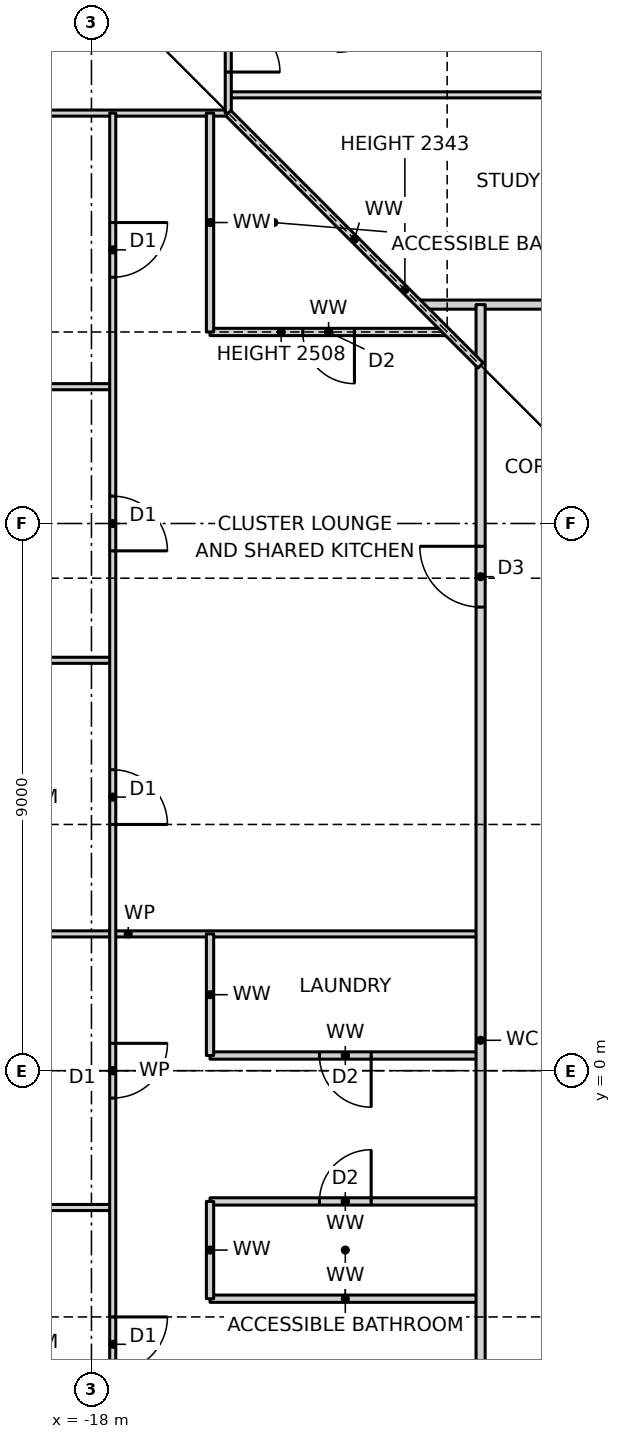
"""IFC4 building model, lengths in metres.
Left out: names, types, materials, properties, quantities, classifications, styles, units other than length and angle.
Written with IfcOpenShell. Run it as: python <this file> out.ifc"""

import sys

from ifc_helpers import new_model, si_unit, direction, frame, frame_2d, origin, place, context, subcontext, project, spatial, rectangle, extrude, element, fill, save


model = new_model("IFC4")
c1 = context("Model", 3, precision=1e-05, world=origin(), true_north=direction((0.0, 1.0)))
c2 = subcontext(c1, "Body", "Model", "MODEL_VIEW")
j1 = project(units=[si_unit("LENGTHUNIT", "METRE"), si_unit("PLANEANGLEUNIT", "RADIAN")], contexts=[c1])
p1 = place(None, origin())
s1 = spatial("IfcSite", under=j1, at=p1, CompositionType="ELEMENT")
p2 = place(p1, origin())
s2 = spatial("IfcBuilding", under=s1, at=p2, CompositionType="ELEMENT")
p3 = place(p2, frame((0.0, 0.0, 60.5)))
s3 = spatial("IfcBuildingStorey", under=s2, at=p3, CompositionType="ELEMENT", Elevation=60.5)
p4 = place(p3, frame((-16.05, -3.75, 0.0), z_axis=(0.0, 0.0, 1.0), x_axis=(1.0, 0.0, 0.0)))
e1 = element("IfcWall", 1, at=p4, inside=s3, PredefinedType="PARTITIONING", context=c2, shape_type="SweptSolid", body=[
    extrude(rectangle(XDim=4.45, YDim=0.12, at=frame_2d((2.225, 0.0))), origin(), (0.0, 0.0, 1.0), 3.27),
])
p5 = place(p3, frame((-23.19, -2.25, 0.0), z_axis=(0.0, 0.0, 1.0), x_axis=(1.0, 0.0, 0.0)))
e2 = element("IfcWall", 2, at=p5, inside=s3, PredefinedType="PARTITIONING", context=c2, shape_type="SweptSolid", body=[
    extrude(rectangle(XDim=5.54, YDim=0.1, at=frame_2d((2.77, 0.0))), origin(), (0.0, 0.0, 1.0), 3.27),
])
p6 = place(p3, frame((-16.05, -2.15, 0.0), z_axis=(0.0, 0.0, 1.0), x_axis=(1.0, 0.0, 0.0)))
e3 = element("IfcWall", 3, at=p6, inside=s3, PredefinedType="PARTITIONING", context=c2, shape_type="SweptSolid", body=[
    extrude(rectangle(XDim=4.45, YDim=0.12, at=frame_2d((2.225, 0.0))), origin(), (0.0, 0.0, 1.0), 3.27),
])
p7 = place(p6, frame((1.8, 0.0, 0.0)))
e4 = element("IfcOpeningElement", 4, at=p7, cuts=e3, PredefinedType="OPENING", context=c2, shape_type="SweptSolid", body=[
    extrude(rectangle(XDim=0.85, YDim=2.1, at=frame_2d((0.425, 1.05))), frame((0.0, 0.07, 0.0), z_axis=(0.0, -1.0, 0.0), x_axis=(1.0, 0.0, 0.0)), (0.0, 0.0, 1.0), 0.14),
])
p8 = place(p3, frame((-16.05, 0.25, 0.0), z_axis=(0.0, 0.0, 1.0), x_axis=(1.0, 0.0, 0.0)))
e5 = element("IfcWall", 5, at=p8, inside=s3, PredefinedType="PARTITIONING", context=c2, shape_type="SweptSolid", body=[
    extrude(rectangle(XDim=4.45, YDim=0.12, at=frame_2d((2.225, 0.0))), origin(), (0.0, 0.0, 1.0), 3.27),
])
p9 = place(p8, frame((1.8, 0.0, 0.0)))
e6 = element("IfcOpeningElement", 6, at=p9, cuts=e5, PredefinedType="OPENING", context=c2, shape_type="SweptSolid", body=[
    extrude(rectangle(XDim=0.85, YDim=2.1, at=frame_2d((0.425, 1.05))), frame((0.0, 0.07, 0.0), z_axis=(0.0, -1.0, 0.0), x_axis=(1.0, 0.0, 0.0)), (0.0, 0.0, 1.0), 0.14),
])
p10 = place(p3, frame((-23.19, 2.25, 0.0), z_axis=(0.0, 0.0, 1.0), x_axis=(1.0, 0.0, 0.0)))
e7 = element("IfcWall", 7, at=p10, inside=s3, PredefinedType="PARTITIONING", context=c2, shape_type="SweptSolid", body=[
    extrude(rectangle(XDim=11.59, YDim=0.1, at=frame_2d((5.795, 0.0))), origin(), (0.0, 0.0, 1.0), 3.27),
])
for number, where, z_axis, x_axis in (
    (8, (-23.19, 6.75, 0.0), (0.0, 0.0, 1.0), (1.0, 0.0, 0.0)),
    (9, (-23.19, 11.25, 0.0), (0.0, 0.0, 1.0), (1.0, 0.0, 0.0)),
):
    element("IfcWall", number, at=place(p3, frame(where, z_axis=z_axis, x_axis=x_axis)), inside=s3, PredefinedType="PARTITIONING", context=c2, shape_type="SweptSolid", body=[
        extrude(rectangle(XDim=5.54, YDim=0.1, at=frame_2d((2.77, 0.0))), origin(), (0.0, 0.0, 1.0), 3.27),
    ])
p11 = place(p3, frame((-16.05, 12.15, 0.0), z_axis=(0.0, 0.0, 1.0), x_axis=(1.0, 0.0, 0.0)))
e10 = element("IfcWall", 10, at=p11, inside=s3, PredefinedType="PARTITIONING", context=c2, shape_type="SweptSolid", body=[
    extrude(rectangle(XDim=3.9, YDim=0.12, at=frame_2d((1.95, 0.0))), origin(), (0.0, 0.0, 1.0), 2.508),
])
p12 = place(p11, frame((1.525, 0.0, 0.0)))
e11 = element("IfcOpeningElement", 11, at=p12, cuts=e10, PredefinedType="OPENING", context=c2, shape_type="SweptSolid", body=[
    extrude(rectangle(XDim=0.85, YDim=2.1, at=frame_2d((0.425, 1.05))), frame((0.0, 0.07, 0.0), z_axis=(0.0, -1.0, 0.0), x_axis=(1.0, 0.0, 0.0)), (0.0, 0.0, 1.0), 0.14),
])
p13 = place(p3, frame((-12.6, 12.6, 0.0), z_axis=(0.0, 0.0, 1.0), x_axis=(1.0, 0.0, 0.0)))
e12 = element("IfcWall", 12, at=p13, inside=s3, PredefinedType="PARTITIONING", context=c2, shape_type="SweptSolid", body=[
    extrude(rectangle(XDim=25.2, YDim=0.15, at=frame_2d((12.6, 0.0))), origin(), (0.0, 0.0, 1.0), 3.27),
])
p14 = place(p13, frame((11.505, 0.0, 0.0)))
e13 = element("IfcOpeningElement", 13, at=p14, cuts=e12, PredefinedType="OPENING", context=c2, shape_type="SweptSolid", body=[
    extrude(rectangle(XDim=1.0, YDim=2.1, at=frame_2d((0.5, 1.05))), frame((0.0, 0.085, 0.0), z_axis=(0.0, -1.0, 0.0), x_axis=(1.0, 0.0, 0.0)), (0.0, 0.0, 1.0), 0.17),
])
p15 = place(p3, frame((-23.19, 15.75, 0.0), z_axis=(0.0, 0.0, 1.0), x_axis=(1.0, 0.0, 0.0)))
e14 = element("IfcWall", 14, at=p15, inside=s3, PredefinedType="PARTITIONING", context=c2, shape_type="SweptSolid", body=[
    extrude(rectangle(XDim=7.44, YDim=0.1, at=frame_2d((3.72, 0.0))), origin(), (0.0, 0.0, 1.0), 3.27),
])
p16 = place(p3, frame((-15.75, 16.05, 0.0), z_axis=(0.0, 0.0, 1.0), x_axis=(1.0, 0.0, 0.0)))
e15 = element("IfcWall", 15, at=p16, inside=s3, PredefinedType="PARTITIONING", context=c2, shape_type="SweptSolid", body=[
    extrude(rectangle(XDim=11.31, YDim=0.1, at=frame_2d((5.655, 0.0))), origin(), (0.0, 0.0, 1.0), 3.27),
])
p17 = place(p16, frame((5.23, 0.0, 0.0)))
e16 = element("IfcOpeningElement", 16, at=p17, cuts=e15, PredefinedType="OPENING", context=c2, shape_type="SweptSolid", body=[
    extrude(rectangle(XDim=0.85, YDim=2.1, at=frame_2d((0.425, 1.05))), frame((0.0, 0.06, 0.0), z_axis=(0.0, -1.0, 0.0), x_axis=(1.0, 0.0, 0.0)), (0.0, 0.0, 1.0), 0.12),
])
p18 = place(p3, frame((-11.6, -11.6, 0.0), z_axis=(0.0, 0.0, 1.0), x_axis=(0.0, 1.0, 0.0)))
e17 = element("IfcWall", 17, at=p18, inside=s3, PredefinedType="PARTITIONING", context=c2, shape_type="SweptSolid", body=[
    extrude(rectangle(XDim=24.2, YDim=0.15, at=frame_2d((12.1, 0.0))), origin(), (0.0, 0.0, 1.0), 3.27),
])
p19 = place(p18, frame((19.225, 0.0, 0.0)))
e18 = element("IfcOpeningElement", 18, at=p19, cuts=e17, PredefinedType="OPENING", context=c2, shape_type="SweptSolid", body=[
    extrude(rectangle(XDim=1.0, YDim=2.1, at=frame_2d((0.5, 1.05))), frame((0.0, 0.085, 0.0), z_axis=(0.0, -1.0, 0.0), x_axis=(1.0, 0.0, 0.0)), (0.0, 0.0, 1.0), 0.17),
])
p20 = place(p18, frame((3.425, 0.0, 0.0)))
e19 = element("IfcOpeningElement", 19, at=p20, cuts=e17, PredefinedType="OPENING", context=c2, shape_type="SweptSolid", body=[
    extrude(rectangle(XDim=1.0, YDim=2.1, at=frame_2d((0.5, 1.05))), frame((0.0, 0.085, 0.0), z_axis=(0.0, -1.0, 0.0), x_axis=(1.0, 0.0, 0.0)), (0.0, 0.0, 1.0), 0.17),
])
p21 = place(p3, frame((-15.75, 15.75, 0.0), z_axis=(0.0, 0.0, 1.0), x_axis=(0.0, 1.0, 0.0)))
e20 = element("IfcWall", 20, at=p21, inside=s3, PredefinedType="PARTITIONING", context=c2, shape_type="SweptSolid", body=[
    extrude(rectangle(XDim=7.44, YDim=0.1, at=frame_2d((3.72, 0.0))), origin(), (0.0, 0.0, 1.0), 3.27),
])
p22 = place(p21, frame((0.675, 0.0, 0.0)))
e21 = element("IfcOpeningElement", 21, at=p22, cuts=e20, PredefinedType="OPENING", context=c2, shape_type="SweptSolid", body=[
    extrude(rectangle(XDim=0.85, YDim=2.1, at=frame_2d((0.425, 1.05))), frame((0.0, 0.06, 0.0), z_axis=(0.0, -1.0, 0.0), x_axis=(1.0, 0.0, 0.0)), (0.0, 0.0, 1.0), 0.12),
])
p23 = place(p3, frame((-16.05, -3.75, 0.0), z_axis=(0.0, 0.0, 1.0), x_axis=(0.0, 1.0, 0.0)))
e22 = element("IfcWall", 22, at=p23, inside=s3, PredefinedType="PARTITIONING", context=c2, shape_type="SweptSolid", body=[
    extrude(rectangle(XDim=1.6, YDim=0.12, at=frame_2d((0.8, 0.0))), origin(), (0.0, 0.0, 1.0), 3.27),
])
p24 = place(p3, frame((-16.05, 0.25, 0.0), z_axis=(0.0, 0.0, 1.0), x_axis=(0.0, 1.0, 0.0)))
e23 = element("IfcWall", 23, at=p24, inside=s3, PredefinedType="PARTITIONING", context=c2, shape_type="SweptSolid", body=[
    extrude(rectangle(XDim=2.0, YDim=0.12, at=frame_2d((1.0, 0.0))), origin(), (0.0, 0.0, 1.0), 3.27),
])
p25 = place(p3, frame((-16.05, 12.15, 0.0), z_axis=(0.0, 0.0, 1.0), x_axis=(0.0, 1.0, 0.0)))
e24 = element("IfcWall", 24, at=p25, inside=s3, PredefinedType="PARTITIONING", context=c2, shape_type="SweptSolid", body=[
    extrude(rectangle(XDim=3.6, YDim=0.12, at=frame_2d((1.8, 0.0))), origin(), (0.0, 0.0, 1.0), 3.27),
])
p26 = place(p3, frame((-17.65, -15.75, 0.0), z_axis=(0.0, 0.0, 1.0), x_axis=(0.0, 1.0, 0.0)))
e25 = element("IfcWall", 25, at=p26, inside=s3, PredefinedType="PARTITIONING", context=c2, shape_type="SweptSolid", body=[
    extrude(rectangle(XDim=31.5, YDim=0.1, at=frame_2d((15.75, 0.0))), origin(), (0.0, 0.0, 1.0), 3.27),
])
p27 = place(p26, frame((28.8, 0.0, 0.0)))
e26 = element("IfcOpeningElement", 26, at=p27, cuts=e25, PredefinedType="OPENING", context=c2, shape_type="SweptSolid", body=[
    extrude(rectangle(XDim=0.9, YDim=2.1, at=frame_2d((0.45, 1.05))), frame((0.0, 0.06, 0.0), z_axis=(0.0, -1.0, 0.0), x_axis=(1.0, 0.0, 0.0)), (0.0, 0.0, 1.0), 0.12),
])
p28 = place(p26, frame((24.3, 0.0, 0.0)))
e27 = element("IfcOpeningElement", 27, at=p28, cuts=e25, PredefinedType="OPENING", context=c2, shape_type="SweptSolid", body=[
    extrude(rectangle(XDim=0.9, YDim=2.1, at=frame_2d((0.45, 1.05))), frame((0.0, 0.06, 0.0), z_axis=(0.0, -1.0, 0.0), x_axis=(1.0, 0.0, 0.0)), (0.0, 0.0, 1.0), 0.12),
])
p29 = place(p26, frame((19.8, 0.0, 0.0)))
e28 = element("IfcOpeningElement", 28, at=p29, cuts=e25, PredefinedType="OPENING", context=c2, shape_type="SweptSolid", body=[
    extrude(rectangle(XDim=0.9, YDim=2.1, at=frame_2d((0.45, 1.05))), frame((0.0, 0.06, 0.0), z_axis=(0.0, -1.0, 0.0), x_axis=(1.0, 0.0, 0.0)), (0.0, 0.0, 1.0), 0.12),
])
p30 = place(p26, frame((15.3, 0.0, 0.0)))
e29 = element("IfcOpeningElement", 29, at=p30, cuts=e25, PredefinedType="OPENING", context=c2, shape_type="SweptSolid", body=[
    extrude(rectangle(XDim=0.9, YDim=2.1, at=frame_2d((0.45, 1.05))), frame((0.0, 0.06, 0.0), z_axis=(0.0, -1.0, 0.0), x_axis=(1.0, 0.0, 0.0)), (0.0, 0.0, 1.0), 0.12),
])
p31 = place(p26, frame((10.8, 0.0, 0.0)))
e30 = element("IfcOpeningElement", 30, at=p31, cuts=e25, PredefinedType="OPENING", context=c2, shape_type="SweptSolid", body=[
    extrude(rectangle(XDim=0.9, YDim=2.1, at=frame_2d((0.45, 1.05))), frame((0.0, 0.06, 0.0), z_axis=(0.0, -1.0, 0.0), x_axis=(1.0, 0.0, 0.0)), (0.0, 0.0, 1.0), 0.12),
])
p32 = place(p26, frame((6.3, 0.0, 0.0)))
e31 = element("IfcOpeningElement", 31, at=p32, cuts=e25, PredefinedType="OPENING", context=c2, shape_type="SweptSolid", body=[
    extrude(rectangle(XDim=0.9, YDim=2.1, at=frame_2d((0.45, 1.05))), frame((0.0, 0.06, 0.0), z_axis=(0.0, -1.0, 0.0), x_axis=(1.0, 0.0, 0.0)), (0.0, 0.0, 1.0), 0.12),
])
p33 = place(p26, frame((1.8, 0.0, 0.0)))
e32 = element("IfcOpeningElement", 32, at=p33, cuts=e25, PredefinedType="OPENING", context=c2, shape_type="SweptSolid", body=[
    extrude(rectangle(XDim=0.9, YDim=2.1, at=frame_2d((0.45, 1.05))), frame((0.0, 0.06, 0.0), z_axis=(0.0, -1.0, 0.0), x_axis=(1.0, 0.0, 0.0)), (0.0, 0.0, 1.0), 0.12),
])
p34 = place(p3, frame((-11.6, 11.6, 0.0), z_axis=(0.0, 0.0, 1.0), x_axis=(-0.707106781187, 0.707106781187, 0.0)))
e33 = element("IfcWall", 33, at=p34, inside=s3, PredefinedType="PARTITIONING", context=c2, shape_type="SweptSolid", body=[
    extrude(rectangle(XDim=5.869, YDim=0.12, at=frame_2d((2.935, 0.0))), origin(), (0.0, 0.0, 1.0), 2.343),
])
p35 = place(p27, frame((0.9, 0.0, 0.0), z_axis=(0.0, 0.0, 1.0), x_axis=(-1.0, 0.0, 0.0)))
e34 = element("IfcDoor", 34, at=p35, inside=s3, OperationType="SINGLE_SWING_LEFT", PredefinedType="DOOR", context=c2, shape_type="SweptSolid", body=[
    extrude(rectangle(XDim=0.9, YDim=2.1, at=frame_2d((0.45, 1.05))), frame((0.0, 0.025, 0.0), z_axis=(0.0, -1.0, 0.0), x_axis=(1.0, 0.0, 0.0)), (0.0, 0.0, 1.0), 0.05),
])
fill(e26, e34)
p36 = place(p28, frame((0.9, 0.0, 0.0), z_axis=(0.0, 0.0, 1.0), x_axis=(-1.0, 0.0, 0.0)))
e35 = element("IfcDoor", 35, at=p36, inside=s3, OperationType="SINGLE_SWING_RIGHT", PredefinedType="DOOR", context=c2, shape_type="SweptSolid", body=[
    extrude(rectangle(XDim=0.9, YDim=2.1, at=frame_2d((0.45, 1.05))), frame((0.0, 0.025, 0.0), z_axis=(0.0, -1.0, 0.0), x_axis=(1.0, 0.0, 0.0)), (0.0, 0.0, 1.0), 0.05),
])
fill(e27, e35)
p37 = place(p29, frame((0.9, 0.0, 0.0), z_axis=(0.0, 0.0, 1.0), x_axis=(-1.0, 0.0, 0.0)))
e36 = element("IfcDoor", 36, at=p37, inside=s3, OperationType="SINGLE_SWING_RIGHT", PredefinedType="DOOR", context=c2, shape_type="SweptSolid", body=[
    extrude(rectangle(XDim=0.9, YDim=2.1, at=frame_2d((0.45, 1.05))), frame((0.0, 0.025, 0.0), z_axis=(0.0, -1.0, 0.0), x_axis=(1.0, 0.0, 0.0)), (0.0, 0.0, 1.0), 0.05),
])
fill(e28, e36)
p38 = place(p19, origin())
e37 = element("IfcDoor", 37, at=p38, inside=s3, OperationType="SINGLE_SWING_RIGHT", PredefinedType="DOOR", context=c2, shape_type="SweptSolid", body=[
    extrude(rectangle(XDim=1.0, YDim=2.1, at=frame_2d((0.5, 1.05))), frame((0.0, 0.025, 0.0), z_axis=(0.0, -1.0, 0.0), x_axis=(1.0, 0.0, 0.0)), (0.0, 0.0, 1.0), 0.05),
])
fill(e18, e37)
p39 = place(p12, frame((0.85, 0.0, 0.0), z_axis=(0.0, 0.0, 1.0), x_axis=(-1.0, 0.0, 0.0)))
e38 = element("IfcDoor", 38, at=p39, inside=s3, OperationType="SINGLE_SWING_LEFT", PredefinedType="DOOR", context=c2, shape_type="SweptSolid", body=[
    extrude(rectangle(XDim=0.85, YDim=2.1, at=frame_2d((0.425, 1.05))), frame((0.0, 0.025, 0.0), z_axis=(0.0, -1.0, 0.0), x_axis=(1.0, 0.0, 0.0)), (0.0, 0.0, 1.0), 0.05),
])
fill(e11, e38)
p40 = place(p30, frame((0.9, 0.0, 0.0), z_axis=(0.0, 0.0, 1.0), x_axis=(-1.0, 0.0, 0.0)))
e39 = element("IfcDoor", 39, at=p40, inside=s3, OperationType="SINGLE_SWING_LEFT", PredefinedType="DOOR", context=c2, shape_type="SweptSolid", body=[
    extrude(rectangle(XDim=0.9, YDim=2.1, at=frame_2d((0.45, 1.05))), frame((0.0, 0.025, 0.0), z_axis=(0.0, -1.0, 0.0), x_axis=(1.0, 0.0, 0.0)), (0.0, 0.0, 1.0), 0.05),
])
fill(e29, e39)
p41 = place(p31, frame((0.9, 0.0, 0.0), z_axis=(0.0, 0.0, 1.0), x_axis=(-1.0, 0.0, 0.0)))
e40 = element("IfcDoor", 40, at=p41, inside=s3, OperationType="SINGLE_SWING_LEFT", PredefinedType="DOOR", context=c2, shape_type="SweptSolid", body=[
    extrude(rectangle(XDim=0.9, YDim=2.1, at=frame_2d((0.45, 1.05))), frame((0.0, 0.025, 0.0), z_axis=(0.0, -1.0, 0.0), x_axis=(1.0, 0.0, 0.0)), (0.0, 0.0, 1.0), 0.05),
])
fill(e30, e40)
p42 = place(p9, frame((0.85, 0.0, 0.0), z_axis=(0.0, 0.0, 1.0), x_axis=(-1.0, 0.0, 0.0)))
e41 = element("IfcDoor", 41, at=p42, inside=s3, OperationType="SINGLE_SWING_LEFT", PredefinedType="DOOR", context=c2, shape_type="SweptSolid", body=[
    extrude(rectangle(XDim=0.85, YDim=2.1, at=frame_2d((0.425, 1.05))), frame((0.0, 0.025, 0.0), z_axis=(0.0, -1.0, 0.0), x_axis=(1.0, 0.0, 0.0)), (0.0, 0.0, 1.0), 0.05),
])
fill(e6, e41)
p43 = place(p7, origin())
e42 = element("IfcDoor", 42, at=p43, inside=s3, OperationType="SINGLE_SWING_RIGHT", PredefinedType="DOOR", context=c2, shape_type="SweptSolid", body=[
    extrude(rectangle(XDim=0.85, YDim=2.1, at=frame_2d((0.425, 1.05))), frame((0.0, 0.025, 0.0), z_axis=(0.0, -1.0, 0.0), x_axis=(1.0, 0.0, 0.0)), (0.0, 0.0, 1.0), 0.05),
])
fill(e4, e42)
p44 = place(p22, frame((0.85, 0.0, 0.0), z_axis=(0.0, 0.0, 1.0), x_axis=(-1.0, 0.0, 0.0)))
e43 = element("IfcDoor", 43, at=p44, inside=s3, OperationType="SINGLE_SWING_RIGHT", PredefinedType="DOOR", context=c2, shape_type="SweptSolid", body=[
    extrude(rectangle(XDim=0.85, YDim=2.1, at=frame_2d((0.425, 1.05))), frame((0.0, 0.025, 0.0), z_axis=(0.0, -1.0, 0.0), x_axis=(1.0, 0.0, 0.0)), (0.0, 0.0, 1.0), 0.05),
])
fill(e21, e43)
save(model, sys.argv[1])
